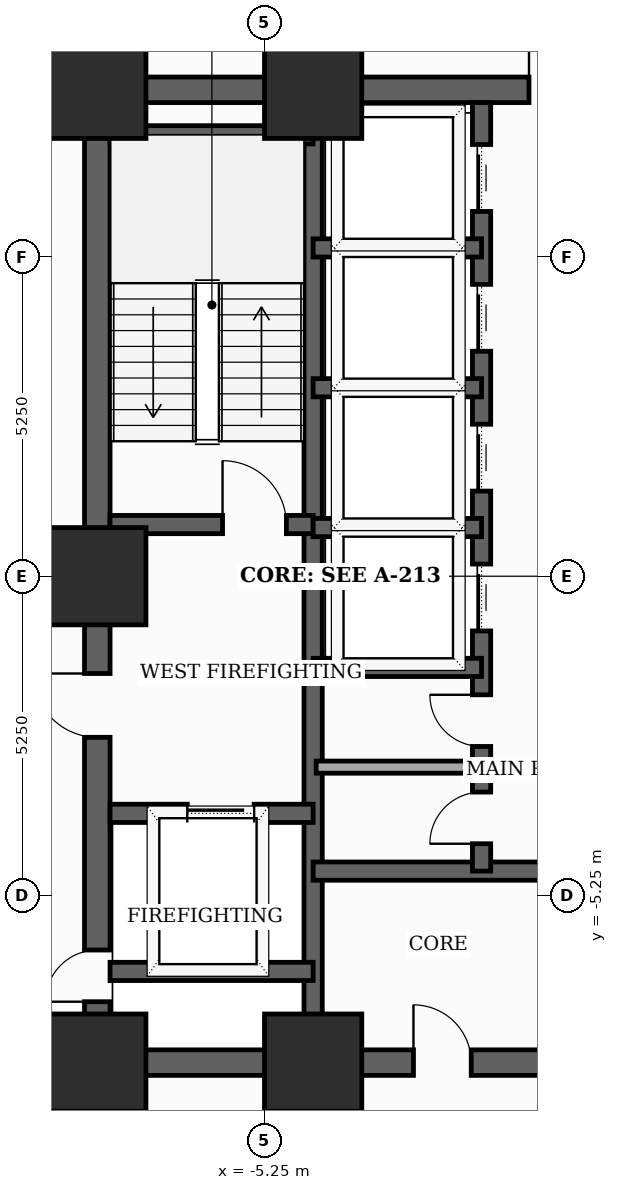
"""IFC4 building model, lengths in metres.
Left out: names, types, materials, properties, quantities, classifications, styles, units other than length and angle.
Written with IfcOpenShell. Run it as: python <this file> out.ifc"""

import sys

from ifc_helpers import new_model, si_unit, direction, frame, frame_2d, origin, origin_2d, place, context, subcontext, project, spatial, rectangle, extrude, element, fill, save


model = new_model("IFC4")
c1 = context("Model", 3, precision=1e-05, world=origin(), true_north=direction((0.0, 1.0)))
c2 = subcontext(c1, "Body", "Model", "MODEL_VIEW")
j1 = project(units=[si_unit("LENGTHUNIT", "METRE"), si_unit("PLANEANGLEUNIT", "RADIAN")], contexts=[c1])
p1 = place(None, origin())
s1 = spatial("IfcSite", under=j1, at=p1, CompositionType="ELEMENT")
p2 = place(p1, origin())
s2 = spatial("IfcBuilding", under=s1, at=p2, CompositionType="ELEMENT")
p3 = place(p2, frame((0.0, 0.0, 33.4)))
s3 = spatial("IfcBuildingStorey", under=s2, at=p3, CompositionType="ELEMENT", Elevation=33.4)
for number, where, z_axis, x_axis in (
    (1, (-8.0, -8.0, 0.0), (0.0, 0.0, 1.0), (1.0, 0.0, 0.0)),
    (2, (-4.45, -8.0, 0.0), (0.0, 0.0, 1.0), (1.0, 0.0, 0.0)),
    (3, (-4.45, 8.0, 0.0), (0.0, 0.0, 1.0), (1.0, 0.0, 0.0)),
    (4, (-8.0, 8.0, 0.0), (0.0, 0.0, 1.0), (1.0, 0.0, 0.0)),
    (5, (-8.0, 0.0, 0.0), (0.0, 0.0, 1.0), (1.0, 0.0, 0.0)),
):
    element("IfcColumn", number, at=place(p3, frame(where, z_axis=z_axis, x_axis=x_axis)), inside=s3, PredefinedType="COLUMN", context=c2, shape_type="SweptSolid", body=[
        extrude(rectangle(XDim=1.6, YDim=1.6, at=origin_2d()), origin(), (0.0, 0.0, 1.0), 3.7),
    ])
p4 = place(p3, frame((-8.0, -8.0, 0.0), z_axis=(0.0, 0.0, 1.0), x_axis=(0.0, 1.0, 0.0)))
e6 = element("IfcWall", 6, at=p4, inside=s3, PredefinedType="SHEAR", context=c2, shape_type="SweptSolid", body=[
    extrude(rectangle(XDim=16.0, YDim=0.42, at=frame_2d((8.0, 0.0))), origin(), (0.0, 0.0, 1.0), 3.5),
])
p5 = place(p4, frame((1.002, 0.0, 0.0)))
e7 = element("IfcOpeningElement", 7, at=p5, cuts=e6, PredefinedType="OPENING", context=c2, shape_type="SweptSolid", body=[
    extrude(rectangle(XDim=0.85, YDim=2.02, at=frame_2d((0.425, 1.01))), frame((0.0, 0.22, 0.0), z_axis=(0.0, -1.0, 0.0), x_axis=(1.0, 0.0, 0.0)), (0.0, 0.0, 1.0), 0.44),
])
p6 = place(p4, frame((5.35, 0.0, 0.0)))
e8 = element("IfcOpeningElement", 8, at=p6, cuts=e6, PredefinedType="OPENING", context=c2, shape_type="SweptSolid", body=[
    extrude(rectangle(XDim=1.05, YDim=2.15, at=frame_2d((0.525, 1.075))), frame((0.0, 0.22, 0.0), z_axis=(0.0, -1.0, 0.0), x_axis=(1.0, 0.0, 0.0)), (0.0, 0.0, 1.0), 0.44),
])
p7 = place(p3, frame((-8.0, -8.0, 0.0), z_axis=(0.0, 0.0, 1.0), x_axis=(1.0, 0.0, 0.0)))
e9 = element("IfcWall", 9, at=p7, inside=s3, PredefinedType="SHEAR", context=c2, shape_type="SweptSolid", body=[
    extrude(rectangle(XDim=16.0, YDim=0.42, at=frame_2d((8.0, 0.0))), origin(), (0.0, 0.0, 1.0), 3.5),
])
p8 = place(p7, frame((5.2, 0.0, 0.0)))
e10 = element("IfcOpeningElement", 10, at=p8, cuts=e9, PredefinedType="OPENING", context=c2, shape_type="SweptSolid", body=[
    extrude(rectangle(XDim=0.95, YDim=2.1, at=frame_2d((0.475, 1.05))), frame((0.0, 0.22, 0.0), z_axis=(0.0, -1.0, 0.0), x_axis=(1.0, 0.0, 0.0)), (0.0, 0.0, 1.0), 0.44),
])
p9 = place(p7, frame((9.8, 0.0, 0.0)))
e11 = element("IfcOpeningElement", 11, at=p9, cuts=e9, PredefinedType="OPENING", context=c2, shape_type="SweptSolid", body=[
    extrude(rectangle(XDim=0.95, YDim=2.1, at=frame_2d((0.475, 1.05))), frame((0.0, 0.22, 0.0), z_axis=(0.0, -1.0, 0.0), x_axis=(1.0, 0.0, 0.0)), (0.0, 0.0, 1.0), 0.44),
])
p10 = place(p3, frame((-8.0, 8.0, 0.0), z_axis=(0.0, 0.0, 1.0), x_axis=(1.0, 0.0, 0.0)))
e12 = element("IfcWall", 12, at=p10, inside=s3, PredefinedType="SHEAR", context=c2, shape_type="SweptSolid", body=[
    extrude(rectangle(XDim=16.0, YDim=0.42, at=frame_2d((8.0, 0.0))), origin(), (0.0, 0.0, 1.0), 3.5),
])
p11 = place(p10, frame((7.1, 0.0, 0.0)))
e13 = element("IfcOpeningElement", 13, at=p11, cuts=e12, PredefinedType="OPENING", context=c2, shape_type="SweptSolid", body=[
    extrude(rectangle(XDim=1.8, YDim=2.15, at=frame_2d((0.9, 1.075))), frame((0.0, 0.22, 0.0), z_axis=(0.0, -1.0, 0.0), x_axis=(1.0, 0.0, 0.0)), (0.0, 0.0, 1.0), 0.44),
])
p12 = place(p3, frame((-4.45, -7.79, 0.0), z_axis=(0.0, 0.0, 1.0), x_axis=(0.0, 1.0, 0.0)))
e14 = element("IfcWall", 14, at=p12, inside=s3, PredefinedType="SHEAR", context=c2, shape_type="SweptSolid", body=[
    extrude(rectangle(XDim=15.58, YDim=0.3, at=frame_2d((7.79, 0.0))), origin(), (0.0, 0.0, 1.0), 3.5),
])
p13 = place(p3, frame((-7.79, 0.85, 0.0), z_axis=(0.0, 0.0, 1.0), x_axis=(1.0, 0.0, 0.0)))
e15 = element("IfcWall", 15, at=p13, inside=s3, PredefinedType="SHEAR", context=c2, shape_type="SweptSolid", body=[
    extrude(rectangle(XDim=3.34, YDim=0.3, at=frame_2d((1.67, 0.0))), origin(), (0.0, 0.0, 1.0), 3.5),
])
p14 = place(p13, frame((1.85, 0.0, 0.0)))
e16 = element("IfcOpeningElement", 16, at=p14, cuts=e15, PredefinedType="OPENING", context=c2, shape_type="SweptSolid", body=[
    extrude(rectangle(XDim=1.05, YDim=2.15, at=frame_2d((0.525, 1.075))), frame((0.0, 0.16, 0.0), z_axis=(0.0, -1.0, 0.0), x_axis=(1.0, 0.0, 0.0)), (0.0, 0.0, 1.0), 0.32),
])
p15 = place(p3, frame((-7.79, 7.26, 0.0), z_axis=(0.0, 0.0, 1.0), x_axis=(1.0, 0.0, 0.0)))
e17 = element("IfcWall", 17, at=p15, inside=s3, PredefinedType="SHEAR", context=c2, shape_type="SweptSolid", body=[
    extrude(rectangle(XDim=3.34, YDim=0.3, at=frame_2d((1.67, 0.0))), origin(), (0.0, 0.0, 1.0), 3.5),
])
p16 = place(p3, frame((-7.79, -3.9, 0.0), z_axis=(0.0, 0.0, 1.0), x_axis=(1.0, 0.0, 0.0)))
e18 = element("IfcWall", 18, at=p16, inside=s3, PredefinedType="SHEAR", context=c2, shape_type="SweptSolid", body=[
    extrude(rectangle(XDim=3.34, YDim=0.3, at=frame_2d((1.67, 0.0))), origin(), (0.0, 0.0, 1.0), 3.5),
])
p17 = place(p16, frame((1.27, 0.0, 0.0)))
e19 = element("IfcOpeningElement", 19, at=p17, cuts=e18, PredefinedType="OPENING", context=c2, shape_type="SweptSolid", body=[
    extrude(rectangle(XDim=1.1, YDim=2.1, at=frame_2d((0.55, 1.05))), frame((0.0, 0.16, 0.0), z_axis=(0.0, -1.0, 0.0), x_axis=(1.0, 0.0, 0.0)), (0.0, 0.0, 1.0), 0.32),
])
p18 = place(p3, frame((-7.79, -6.5, 0.0), z_axis=(0.0, 0.0, 1.0), x_axis=(1.0, 0.0, 0.0)))
e20 = element("IfcWall", 20, at=p18, inside=s3, PredefinedType="SHEAR", context=c2, shape_type="SweptSolid", body=[
    extrude(rectangle(XDim=3.34, YDim=0.3, at=frame_2d((1.67, 0.0))), origin(), (0.0, 0.0, 1.0), 3.5),
])
p19 = place(p3, frame((-4.45, -4.85, 0.0), z_axis=(0.0, 0.0, 1.0), x_axis=(1.0, 0.0, 0.0)))
e21 = element("IfcWall", 21, at=p19, inside=s3, PredefinedType="SHEAR", context=c2, shape_type="SweptSolid", body=[
    extrude(rectangle(XDim=8.9, YDim=0.3, at=frame_2d((4.45, 0.0))), origin(), (0.0, 0.0, 1.0), 3.5),
])
p20 = place(p3, frame((-1.68, -4.85, 0.0), z_axis=(0.0, 0.0, 1.0), x_axis=(0.0, 1.0, 0.0)))
e22 = element("IfcWall", 22, at=p20, inside=s3, PredefinedType="SHEAR", context=c2, shape_type="SweptSolid", body=[
    extrude(rectangle(XDim=12.64, YDim=0.3, at=frame_2d((6.32, 0.0))), origin(), (0.0, 0.0, 1.0), 3.5),
])
p21 = place(p20, frame((3.95, 0.0, 0.0)))
e23 = element("IfcOpeningElement", 23, at=p21, cuts=e22, PredefinedType="OPENING", context=c2, shape_type="SweptSolid", body=[
    extrude(rectangle(XDim=1.1, YDim=2.1, at=frame_2d((0.55, 1.05))), frame((0.0, 0.16, 0.0), z_axis=(0.0, -1.0, 0.0), x_axis=(1.0, 0.0, 0.0)), (0.0, 0.0, 1.0), 0.32),
])
p22 = place(p20, frame((6.25, 0.0, 0.0)))
e24 = element("IfcOpeningElement", 24, at=p22, cuts=e22, PredefinedType="OPENING", context=c2, shape_type="SweptSolid", body=[
    extrude(rectangle(XDim=1.1, YDim=2.1, at=frame_2d((0.55, 1.05))), frame((0.0, 0.16, 0.0), z_axis=(0.0, -1.0, 0.0), x_axis=(1.0, 0.0, 0.0)), (0.0, 0.0, 1.0), 0.32),
])
p23 = place(p20, frame((8.55, 0.0, 0.0)))
e25 = element("IfcOpeningElement", 25, at=p23, cuts=e22, PredefinedType="OPENING", context=c2, shape_type="SweptSolid", body=[
    extrude(rectangle(XDim=1.1, YDim=2.1, at=frame_2d((0.55, 1.05))), frame((0.0, 0.16, 0.0), z_axis=(0.0, -1.0, 0.0), x_axis=(1.0, 0.0, 0.0)), (0.0, 0.0, 1.0), 0.32),
])
p24 = place(p20, frame((10.85, 0.0, 0.0)))
e26 = element("IfcOpeningElement", 26, at=p24, cuts=e22, PredefinedType="OPENING", context=c2, shape_type="SweptSolid", body=[
    extrude(rectangle(XDim=1.1, YDim=2.1, at=frame_2d((0.55, 1.05))), frame((0.0, 0.16, 0.0), z_axis=(0.0, -1.0, 0.0), x_axis=(1.0, 0.0, 0.0)), (0.0, 0.0, 1.0), 0.32),
])
p25 = place(p20, frame((0.45, 0.0, 0.0)))
e27 = element("IfcOpeningElement", 27, at=p25, cuts=e22, PredefinedType="OPENING", context=c2, shape_type="SweptSolid", body=[
    extrude(rectangle(XDim=0.85, YDim=2.02, at=frame_2d((0.425, 1.01))), frame((0.0, 0.16, 0.0), z_axis=(0.0, -1.0, 0.0), x_axis=(1.0, 0.0, 0.0)), (0.0, 0.0, 1.0), 0.32),
])
p26 = place(p20, frame((2.05, 0.0, 0.0)))
e28 = element("IfcOpeningElement", 28, at=p26, cuts=e22, PredefinedType="OPENING", context=c2, shape_type="SweptSolid", body=[
    extrude(rectangle(XDim=0.85, YDim=2.02, at=frame_2d((0.425, 1.01))), frame((0.0, 0.16, 0.0), z_axis=(0.0, -1.0, 0.0), x_axis=(1.0, 0.0, 0.0)), (0.0, 0.0, 1.0), 0.32),
])
for number, where, z_axis, x_axis in (
    (29, (-4.45, -1.5, 0.0), (0.0, 0.0, 1.0), (1.0, 0.0, 0.0)),
    (30, (-4.45, 0.8, 0.0), (0.0, 0.0, 1.0), (1.0, 0.0, 0.0)),
    (31, (-4.45, 3.1, 0.0), (0.0, 0.0, 1.0), (1.0, 0.0, 0.0)),
    (32, (-4.45, 5.4, 0.0), (0.0, 0.0, 1.0), (1.0, 0.0, 0.0)),
):
    element("IfcWall", number, at=place(p3, frame(where, z_axis=z_axis, x_axis=x_axis)), inside=s3, PredefinedType="SHEAR", context=c2, shape_type="SweptSolid", body=[
        extrude(rectangle(XDim=2.77, YDim=0.3, at=frame_2d((1.385, 0.0))), origin(), (0.0, 0.0, 1.0), 3.5),
    ])
p27 = place(p3, frame((-4.4, -3.14, 0.0), z_axis=(0.0, 0.0, 1.0), x_axis=(1.0, 0.0, 0.0)))
e33 = element("IfcWall", 33, at=p27, inside=s3, PredefinedType="SOLIDWALL", context=c2, shape_type="SweptSolid", body=[
    extrude(rectangle(XDim=2.68, YDim=0.2, at=frame_2d((1.34, 0.0))), origin(), (0.0, 0.0, 1.0), 3.5),
])
p28 = place(p5, origin())
e34 = element("IfcDoor", 34, at=p28, inside=s3, OperationType="SINGLE_SWING_LEFT", PredefinedType="TRAPDOOR", context=c2, shape_type="SweptSolid", body=[
    extrude(rectangle(XDim=0.85, YDim=2.02, at=frame_2d((0.425, 1.01))), frame((0.0, 0.025, 0.0), z_axis=(0.0, -1.0, 0.0), x_axis=(1.0, 0.0, 0.0)), (0.0, 0.0, 1.0), 0.05),
])
fill(e7, e34)
p29 = place(p6, origin())
e35 = element("IfcDoor", 35, at=p29, inside=s3, OperationType="SINGLE_SWING_RIGHT", PredefinedType="DOOR", context=c2, shape_type="SweptSolid", body=[
    extrude(rectangle(XDim=1.05, YDim=2.15, at=frame_2d((0.525, 1.075))), frame((0.0, 0.025, 0.0), z_axis=(0.0, -1.0, 0.0), x_axis=(1.0, 0.0, 0.0)), (0.0, 0.0, 1.0), 0.05),
])
fill(e8, e35)
p30 = place(p8, origin())
e36 = element("IfcDoor", 36, at=p30, inside=s3, OperationType="SINGLE_SWING_LEFT", PredefinedType="DOOR", context=c2, shape_type="SweptSolid", body=[
    extrude(rectangle(XDim=0.95, YDim=2.1, at=frame_2d((0.475, 1.05))), frame((0.0, 0.025, 0.0), z_axis=(0.0, -1.0, 0.0), x_axis=(1.0, 0.0, 0.0)), (0.0, 0.0, 1.0), 0.05),
])
fill(e10, e36)
p31 = place(p11, origin())
e37 = element("IfcDoor", 37, at=p31, inside=s3, OperationType="DOUBLE_DOOR_SINGLE_SWING", PredefinedType="DOOR", context=c2, shape_type="SweptSolid", body=[
    extrude(rectangle(XDim=1.8, YDim=2.15, at=frame_2d((0.9, 1.075))), frame((0.0, 0.025, 0.0), z_axis=(0.0, -1.0, 0.0), x_axis=(1.0, 0.0, 0.0)), (0.0, 0.0, 1.0), 0.05),
])
fill(e13, e37)
p32 = place(p14, origin())
e38 = element("IfcDoor", 38, at=p32, inside=s3, OperationType="SINGLE_SWING_LEFT", PredefinedType="DOOR", context=c2, shape_type="SweptSolid", body=[
    extrude(rectangle(XDim=1.05, YDim=2.15, at=frame_2d((0.525, 1.075))), frame((0.0, 0.025, 0.0), z_axis=(0.0, -1.0, 0.0), x_axis=(1.0, 0.0, 0.0)), (0.0, 0.0, 1.0), 0.05),
])
fill(e16, e38)
p33 = place(p17, origin())
e39 = element("IfcDoor", 39, at=p33, inside=s3, OperationType="SLIDING_TO_LEFT", PredefinedType="DOOR", context=c2, shape_type="SweptSolid", body=[
    extrude(rectangle(XDim=1.1, YDim=2.1, at=frame_2d((0.55, 1.05))), frame((0.0, 0.025, 0.0), z_axis=(0.0, -1.0, 0.0), x_axis=(1.0, 0.0, 0.0)), (0.0, 0.0, 1.0), 0.05),
])
fill(e19, e39)
p34 = place(p21, origin())
e40 = element("IfcDoor", 40, at=p34, inside=s3, OperationType="SLIDING_TO_LEFT", PredefinedType="DOOR", context=c2, shape_type="SweptSolid", body=[
    extrude(rectangle(XDim=1.1, YDim=2.1, at=frame_2d((0.55, 1.05))), frame((0.0, 0.025, 0.0), z_axis=(0.0, -1.0, 0.0), x_axis=(1.0, 0.0, 0.0)), (0.0, 0.0, 1.0), 0.05),
])
fill(e23, e40)
p35 = place(p22, origin())
e41 = element("IfcDoor", 41, at=p35, inside=s3, OperationType="SLIDING_TO_LEFT", PredefinedType="DOOR", context=c2, shape_type="SweptSolid", body=[
    extrude(rectangle(XDim=1.1, YDim=2.1, at=frame_2d((0.55, 1.05))), frame((0.0, 0.025, 0.0), z_axis=(0.0, -1.0, 0.0), x_axis=(1.0, 0.0, 0.0)), (0.0, 0.0, 1.0), 0.05),
])
fill(e24, e41)
p36 = place(p23, origin())
e42 = element("IfcDoor", 42, at=p36, inside=s3, OperationType="SLIDING_TO_LEFT", PredefinedType="DOOR", context=c2, shape_type="SweptSolid", body=[
    extrude(rectangle(XDim=1.1, YDim=2.1, at=frame_2d((0.55, 1.05))), frame((0.0, 0.025, 0.0), z_axis=(0.0, -1.0, 0.0), x_axis=(1.0, 0.0, 0.0)), (0.0, 0.0, 1.0), 0.05),
])
fill(e25, e42)
p37 = place(p24, origin())
e43 = element("IfcDoor", 43, at=p37, inside=s3, OperationType="SLIDING_TO_LEFT", PredefinedType="DOOR", context=c2, shape_type="SweptSolid", body=[
    extrude(rectangle(XDim=1.1, YDim=2.1, at=frame_2d((0.55, 1.05))), frame((0.0, 0.025, 0.0), z_axis=(0.0, -1.0, 0.0), x_axis=(1.0, 0.0, 0.0)), (0.0, 0.0, 1.0), 0.05),
])
fill(e26, e43)
p38 = place(p25, origin())
e44 = element("IfcDoor", 44, at=p38, inside=s3, OperationType="SINGLE_SWING_LEFT", PredefinedType="TRAPDOOR", context=c2, shape_type="SweptSolid", body=[
    extrude(rectangle(XDim=0.85, YDim=2.02, at=frame_2d((0.425, 1.01))), frame((0.0, 0.025, 0.0), z_axis=(0.0, -1.0, 0.0), x_axis=(1.0, 0.0, 0.0)), (0.0, 0.0, 1.0), 0.05),
])
fill(e27, e44)
p39 = place(p26, origin())
e45 = element("IfcDoor", 45, at=p39, inside=s3, OperationType="SINGLE_SWING_RIGHT", PredefinedType="TRAPDOOR", context=c2, shape_type="SweptSolid", body=[
    extrude(rectangle(XDim=0.85, YDim=2.02, at=frame_2d((0.425, 1.01))), frame((0.0, 0.025, 0.0), z_axis=(0.0, -1.0, 0.0), x_axis=(1.0, 0.0, 0.0)), (0.0, 0.0, 1.0), 0.05),
])
fill(e28, e45)
save(model, sys.argv[1])
